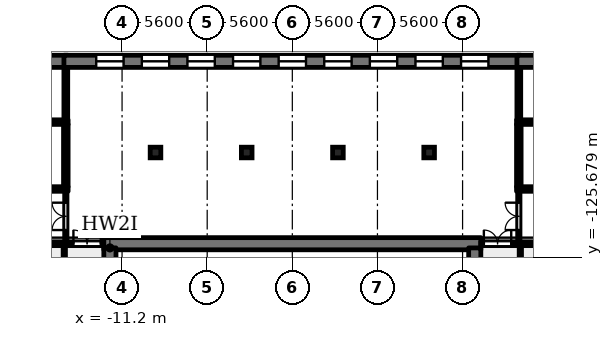
"""IFC4 building model, lengths in metres.
Left out: names, types, materials, properties, quantities, classifications, styles, units other than length and angle.
Written with IfcOpenShell. Run it as: python <this file> out.ifc"""

import sys

from ifc_helpers import new_model, si_unit, direction, frame, frame_2d, origin, origin_2d, place, context, subcontext, project, spatial, rectangle, extrude, element, fill, save


model = new_model("IFC4")
c1 = context("Model", 3, precision=1e-05, world=origin(), true_north=direction((0.0, 1.0)))
c2 = subcontext(c1, "Body", "Model", "MODEL_VIEW")
j1 = project(units=[si_unit("LENGTHUNIT", "METRE"), si_unit("PLANEANGLEUNIT", "RADIAN")], contexts=[c1])
p1 = place(None, origin())
s1 = spatial("IfcSite", under=j1, at=p1, CompositionType="ELEMENT")
p2 = place(p1, origin())
s2 = spatial("IfcBuilding", under=s1, at=p2, CompositionType="ELEMENT")
p3 = place(p2, frame((0.0, 0.0, 20.9)))
s3 = spatial("IfcBuildingStorey", under=s2, at=p3, CompositionType="ELEMENT", Elevation=20.9)
for number, where, z_axis, x_axis in (
    (1, (-9.0, -118.8, 0.0), (0.0, 0.0, 1.0), (1.0, 0.0, 0.0)),
    (2, (-3.0, -118.8, 0.0), (0.0, 0.0, 1.0), (1.0, 0.0, 0.0)),
    (3, (3.0, -118.8, 0.0), (0.0, 0.0, 1.0), (1.0, 0.0, 0.0)),
    (4, (9.0, -118.8, 0.0), (0.0, 0.0, 1.0), (1.0, 0.0, 0.0)),
):
    element("IfcColumn", number, at=place(p3, frame(where, z_axis=z_axis, x_axis=x_axis)), inside=s3, PredefinedType="COLUMN", context=c2, shape_type="SweptSolid", body=[
        extrude(rectangle(XDim=0.7, YDim=0.7, at=origin_2d()), origin(), (0.0, 0.0, 1.0), 6.591),
    ])
p4 = place(p3, frame((-29.2, -124.8, 0.0), z_axis=(0.0, 0.0, 1.0), x_axis=(1.0, 0.0, 0.0)))
e5 = element("IfcWall", 5, at=p4, inside=s3, PredefinedType="SOLIDWALL", context=c2, shape_type="SweptSolid", body=[
    extrude(rectangle(XDim=16.8, YDim=0.25, at=frame_2d((8.4, 0.0))), origin(), (0.0, 0.0, 1.0), 4.5),
])
p5 = place(p4, frame((14.8, 0.0, 0.0)))
e6 = element("IfcOpeningElement", 6, at=p5, cuts=e5, PredefinedType="OPENING", context=c2, shape_type="SweptSolid", body=[
    extrude(rectangle(XDim=1.8, YDim=2.1, at=frame_2d((0.9, 1.05))), frame((0.0, 0.135, 0.0), z_axis=(0.0, -1.0, 0.0), x_axis=(1.0, 0.0, 0.0)), (0.0, 0.0, 1.0), 0.27),
])
p6 = place(p3, frame((-12.4, -124.8, 0.0), z_axis=(0.0, 0.0, 1.0), x_axis=(1.0, 0.0, 0.0)))
e7 = element("IfcWall", 7, at=p6, inside=s3, PredefinedType="SOLIDWALL", context=c2, shape_type="SweptSolid", body=[
    extrude(rectangle(XDim=24.8, YDim=0.8, at=frame_2d((12.4, 0.0))), origin(), (0.0, 0.0, 1.0), 5.55),
])
p7 = place(p3, frame((12.4, -124.8, 0.0), z_axis=(0.0, 0.0, 1.0), x_axis=(1.0, 0.0, 0.0)))
e8 = element("IfcWall", 8, at=p7, inside=s3, PredefinedType="SOLIDWALL", context=c2, shape_type="SweptSolid", body=[
    extrude(rectangle(XDim=16.8, YDim=0.25, at=frame_2d((8.4, 0.0))), origin(), (0.0, 0.0, 1.0), 4.5),
])
p8 = place(p7, frame((0.2, 0.0, 0.0)))
e9 = element("IfcOpeningElement", 9, at=p8, cuts=e8, PredefinedType="OPENING", context=c2, shape_type="SweptSolid", body=[
    extrude(rectangle(XDim=1.8, YDim=2.1, at=frame_2d((0.9, 1.05))), frame((0.0, 0.135, 0.0), z_axis=(0.0, -1.0, 0.0), x_axis=(1.0, 0.0, 0.0)), (0.0, 0.0, 1.0), 0.27),
])
p9 = place(p3, frame((-29.2, -121.2, 0.0), z_axis=(0.0, 0.0, 1.0), x_axis=(1.0, 0.0, 0.0)))
e10 = element("IfcWall", 10, at=p9, inside=s3, PredefinedType="SOLIDWALL", context=c2, shape_type="SweptSolid", body=[
    extrude(rectangle(XDim=14.45, YDim=0.3, at=frame_2d((7.225, 0.0))), origin(), (0.0, 0.0, 1.0), 4.5),
])
p10 = place(p9, frame((4.0, 0.0, 0.0)))
e11 = element("IfcOpeningElement", 11, at=p10, cuts=e10, PredefinedType="OPENING", context=c2, shape_type="SweptSolid", body=[
    extrude(rectangle(XDim=1.1, YDim=2.1, at=frame_2d((0.55, 1.05))), frame((0.0, 0.16, 0.0), z_axis=(0.0, -1.0, 0.0), x_axis=(1.0, 0.0, 0.0)), (0.0, 0.0, 1.0), 0.32),
])
p11 = place(p9, frame((6.5, 0.0, 0.0)))
e12 = element("IfcOpeningElement", 12, at=p11, cuts=e10, PredefinedType="OPENING", context=c2, shape_type="SweptSolid", body=[
    extrude(rectangle(XDim=1.1, YDim=2.1, at=frame_2d((0.55, 1.05))), frame((0.0, 0.16, 0.0), z_axis=(0.0, -1.0, 0.0), x_axis=(1.0, 0.0, 0.0)), (0.0, 0.0, 1.0), 0.32),
])
p12 = place(p9, frame((0.95, 0.0, 0.0)))
e13 = element("IfcOpeningElement", 13, at=p12, cuts=e10, PredefinedType="OPENING", context=c2, shape_type="SweptSolid", body=[
    extrude(rectangle(XDim=1.1, YDim=2.1, at=frame_2d((0.55, 1.05))), frame((0.0, 0.16, 0.0), z_axis=(0.0, -1.0, 0.0), x_axis=(1.0, 0.0, 0.0)), (0.0, 0.0, 1.0), 0.32),
])
p13 = place(p9, frame((10.8, 0.0, 0.0)))
e14 = element("IfcOpeningElement", 14, at=p13, cuts=e10, PredefinedType="OPENING", context=c2, shape_type="SweptSolid", body=[
    extrude(rectangle(XDim=1.0, YDim=2.1, at=frame_2d((0.5, 1.05))), frame((0.0, 0.16, 0.0), z_axis=(0.0, -1.0, 0.0), x_axis=(1.0, 0.0, 0.0)), (0.0, 0.0, 1.0), 0.32),
])
p14 = place(p3, frame((14.75, -121.2, 0.0), z_axis=(0.0, 0.0, 1.0), x_axis=(1.0, 0.0, 0.0)))
e15 = element("IfcWall", 15, at=p14, inside=s3, PredefinedType="SOLIDWALL", context=c2, shape_type="SweptSolid", body=[
    extrude(rectangle(XDim=14.45, YDim=0.3, at=frame_2d((7.225, 0.0))), origin(), (0.0, 0.0, 1.0), 4.5),
])
p15 = place(p14, frame((6.85, 0.0, 0.0)))
e16 = element("IfcOpeningElement", 16, at=p15, cuts=e15, PredefinedType="OPENING", context=c2, shape_type="SweptSolid", body=[
    extrude(rectangle(XDim=1.1, YDim=2.1, at=frame_2d((0.55, 1.05))), frame((0.0, 0.16, 0.0), z_axis=(0.0, -1.0, 0.0), x_axis=(1.0, 0.0, 0.0)), (0.0, 0.0, 1.0), 0.32),
])
p16 = place(p14, frame((9.35, 0.0, 0.0)))
e17 = element("IfcOpeningElement", 17, at=p16, cuts=e15, PredefinedType="OPENING", context=c2, shape_type="SweptSolid", body=[
    extrude(rectangle(XDim=1.1, YDim=2.1, at=frame_2d((0.55, 1.05))), frame((0.0, 0.16, 0.0), z_axis=(0.0, -1.0, 0.0), x_axis=(1.0, 0.0, 0.0)), (0.0, 0.0, 1.0), 0.32),
])
p17 = place(p14, frame((12.4, 0.0, 0.0)))
e18 = element("IfcOpeningElement", 18, at=p17, cuts=e15, PredefinedType="OPENING", context=c2, shape_type="SweptSolid", body=[
    extrude(rectangle(XDim=1.1, YDim=2.1, at=frame_2d((0.55, 1.05))), frame((0.0, 0.16, 0.0), z_axis=(0.0, -1.0, 0.0), x_axis=(1.0, 0.0, 0.0)), (0.0, 0.0, 1.0), 0.32),
])
p18 = place(p14, frame((2.65, 0.0, 0.0)))
e19 = element("IfcOpeningElement", 19, at=p18, cuts=e15, PredefinedType="OPENING", context=c2, shape_type="SweptSolid", body=[
    extrude(rectangle(XDim=1.0, YDim=2.1, at=frame_2d((0.5, 1.05))), frame((0.0, 0.16, 0.0), z_axis=(0.0, -1.0, 0.0), x_axis=(1.0, 0.0, 0.0)), (0.0, 0.0, 1.0), 0.32),
])
for number, where, z_axis, x_axis in (
    (20, (-25.75, -116.8, 0.0), (0.0, 0.0, 1.0), (1.0, 0.0, 0.0)),
    (21, (14.75, -116.8, 0.0), (0.0, 0.0, 1.0), (1.0, 0.0, 0.0)),
):
    element("IfcWall", number, at=place(p3, frame(where, z_axis=z_axis, x_axis=x_axis)), inside=s3, PredefinedType="SOLIDWALL", context=c2, shape_type="SweptSolid", body=[
        extrude(rectangle(XDim=11.0, YDim=0.3, at=frame_2d((5.5, 0.0))), origin(), (0.0, 0.0, 1.0), 4.5),
    ])
p19 = place(p3, frame((-26.05, -112.8, 0.0), z_axis=(0.0, 0.0, 1.0), x_axis=(1.0, 0.0, 0.0)))
e22 = element("IfcWall", 22, at=p19, inside=s3, PredefinedType="SOLIDWALL", context=c2, shape_type="SweptSolid", body=[
    extrude(rectangle(XDim=11.275, YDim=0.8, at=frame_2d((5.637, 0.0))), origin(), (0.0, 0.0, 1.0), 4.5),
])
p20 = place(p3, frame((-15.025, -112.8, 0.0), z_axis=(0.0, 0.0, 1.0), x_axis=(1.0, 0.0, 0.0)))
e23 = element("IfcWall", 23, at=p20, inside=s3, PredefinedType="SOLIDWALL", context=c2, shape_type="SweptSolid", body=[
    extrude(rectangle(XDim=30.05, YDim=0.8, at=frame_2d((15.025, 0.0))), origin(), (0.0, 0.0, 1.0), 4.5),
])
p21 = place(p20, frame((2.125, 0.0, 0.9)))
e24 = element("IfcOpeningElement", 24, at=p21, cuts=e23, PredefinedType="OPENING", context=c2, shape_type="SweptSolid", body=[
    extrude(rectangle(XDim=1.8, YDim=1.5, at=frame_2d((0.9, 0.75))), frame((0.0, 0.41, 0.0), z_axis=(0.0, -1.0, 0.0), x_axis=(1.0, 0.0, 0.0)), (0.0, 0.0, 1.0), 0.82),
])
p22 = place(p20, frame((5.125, 0.0, 0.9)))
e25 = element("IfcOpeningElement", 25, at=p22, cuts=e23, PredefinedType="OPENING", context=c2, shape_type="SweptSolid", body=[
    extrude(rectangle(XDim=1.8, YDim=1.5, at=frame_2d((0.9, 0.75))), frame((0.0, 0.41, 0.0), z_axis=(0.0, -1.0, 0.0), x_axis=(1.0, 0.0, 0.0)), (0.0, 0.0, 1.0), 0.82),
])
p23 = place(p20, frame((8.125, 0.0, 0.9)))
e26 = element("IfcOpeningElement", 26, at=p23, cuts=e23, PredefinedType="OPENING", context=c2, shape_type="SweptSolid", body=[
    extrude(rectangle(XDim=1.8, YDim=1.5, at=frame_2d((0.9, 0.75))), frame((0.0, 0.41, 0.0), z_axis=(0.0, -1.0, 0.0), x_axis=(1.0, 0.0, 0.0)), (0.0, 0.0, 1.0), 0.82),
])
p24 = place(p20, frame((11.125, 0.0, 0.9)))
e27 = element("IfcOpeningElement", 27, at=p24, cuts=e23, PredefinedType="OPENING", context=c2, shape_type="SweptSolid", body=[
    extrude(rectangle(XDim=1.8, YDim=1.5, at=frame_2d((0.9, 0.75))), frame((0.0, 0.41, 0.0), z_axis=(0.0, -1.0, 0.0), x_axis=(1.0, 0.0, 0.0)), (0.0, 0.0, 1.0), 0.82),
])
p25 = place(p20, frame((14.125, 0.0, 0.9)))
e28 = element("IfcOpeningElement", 28, at=p25, cuts=e23, PredefinedType="OPENING", context=c2, shape_type="SweptSolid", body=[
    extrude(rectangle(XDim=1.8, YDim=1.5, at=frame_2d((0.9, 0.75))), frame((0.0, 0.41, 0.0), z_axis=(0.0, -1.0, 0.0), x_axis=(1.0, 0.0, 0.0)), (0.0, 0.0, 1.0), 0.82),
])
p26 = place(p20, frame((17.125, 0.0, 0.9)))
e29 = element("IfcOpeningElement", 29, at=p26, cuts=e23, PredefinedType="OPENING", context=c2, shape_type="SweptSolid", body=[
    extrude(rectangle(XDim=1.8, YDim=1.5, at=frame_2d((0.9, 0.75))), frame((0.0, 0.41, 0.0), z_axis=(0.0, -1.0, 0.0), x_axis=(1.0, 0.0, 0.0)), (0.0, 0.0, 1.0), 0.82),
])
p27 = place(p20, frame((20.125, 0.0, 0.9)))
e30 = element("IfcOpeningElement", 30, at=p27, cuts=e23, PredefinedType="OPENING", context=c2, shape_type="SweptSolid", body=[
    extrude(rectangle(XDim=1.8, YDim=1.5, at=frame_2d((0.9, 0.75))), frame((0.0, 0.41, 0.0), z_axis=(0.0, -1.0, 0.0), x_axis=(1.0, 0.0, 0.0)), (0.0, 0.0, 1.0), 0.82),
])
p28 = place(p20, frame((23.125, 0.0, 0.9)))
e31 = element("IfcOpeningElement", 31, at=p28, cuts=e23, PredefinedType="OPENING", context=c2, shape_type="SweptSolid", body=[
    extrude(rectangle(XDim=1.8, YDim=1.5, at=frame_2d((0.9, 0.75))), frame((0.0, 0.41, 0.0), z_axis=(0.0, -1.0, 0.0), x_axis=(1.0, 0.0, 0.0)), (0.0, 0.0, 1.0), 0.82),
])
p29 = place(p20, frame((26.125, 0.0, 0.9)))
e32 = element("IfcOpeningElement", 32, at=p29, cuts=e23, PredefinedType="OPENING", context=c2, shape_type="SweptSolid", body=[
    extrude(rectangle(XDim=1.8, YDim=1.5, at=frame_2d((0.9, 0.75))), frame((0.0, 0.41, 0.0), z_axis=(0.0, -1.0, 0.0), x_axis=(1.0, 0.0, 0.0)), (0.0, 0.0, 1.0), 0.82),
])
p30 = place(p3, frame((14.775, -112.8, 0.0), z_axis=(0.0, 0.0, 1.0), x_axis=(1.0, 0.0, 0.0)))
e33 = element("IfcWall", 33, at=p30, inside=s3, PredefinedType="SOLIDWALL", context=c2, shape_type="SweptSolid", body=[
    extrude(rectangle(XDim=11.275, YDim=0.8, at=frame_2d((5.637, 0.0))), origin(), (0.0, 0.0, 1.0), 4.5),
])
p31 = place(p3, frame((-15.0, -131.075, 0.0), z_axis=(0.0, 0.0, 1.0), x_axis=(0.0, 1.0, 0.0)))
e34 = element("IfcWall", 34, at=p31, inside=s3, PredefinedType="PARTITIONING", context=c2, shape_type="SweptSolid", body=[
    extrude(rectangle(XDim=6.15, YDim=0.15, at=frame_2d((3.075, 0.0))), origin(), (0.0, 0.0, 1.0), 4.5),
])
p32 = place(p3, frame((-14.9, -124.675, 0.0), z_axis=(0.0, 0.0, 1.0), x_axis=(0.0, 1.0, 0.0)))
e35 = element("IfcWall", 35, at=p32, inside=s3, PredefinedType="PARTITIONING", context=c2, shape_type="SweptSolid", body=[
    extrude(rectangle(XDim=3.325, YDim=0.15, at=frame_2d((1.663, 0.0))), origin(), (0.0, 0.0, 1.0), 4.5),
])
p33 = place(p32, frame((0.775, 0.0, 0.0)))
e36 = element("IfcOpeningElement", 36, at=p33, cuts=e35, PredefinedType="OPENING", context=c2, shape_type="SweptSolid", body=[
    extrude(rectangle(XDim=1.8, YDim=2.1, at=frame_2d((0.9, 1.05))), frame((0.0, 0.085, 0.0), z_axis=(0.0, -1.0, 0.0), x_axis=(1.0, 0.0, 0.0)), (0.0, 0.0, 1.0), 0.17),
])
p34 = place(p3, frame((-14.9, -121.05, 0.0), z_axis=(0.0, 0.0, 1.0), x_axis=(0.0, 1.0, 0.0)))
e37 = element("IfcWall", 37, at=p34, inside=s3, PredefinedType="SOLIDWALL", context=c2, shape_type="SweptSolid", body=[
    extrude(rectangle(XDim=4.1, YDim=0.3, at=frame_2d((2.05, 0.0))), origin(), (0.0, 0.0, 1.0), 4.5),
])
p35 = place(p3, frame((-14.9, -116.65, 0.0), z_axis=(0.0, 0.0, 1.0), x_axis=(0.0, 1.0, 0.0)))
e38 = element("IfcWall", 38, at=p35, inside=s3, PredefinedType="SOLIDWALL", context=c2, shape_type="SweptSolid", body=[
    extrude(rectangle(XDim=3.45, YDim=0.25, at=frame_2d((1.725, 0.0))), origin(), (0.0, 0.0, 1.0), 4.5),
])
for number, where, z_axis, x_axis in (
    (39, (-12.0, -159.2, 0.0), (0.0, 0.0, 1.0), (0.0, 1.0, 0.0)),
    (40, (12.0, -159.2, 0.0), (0.0, 0.0, 1.0), (0.0, 1.0, 0.0)),
):
    element("IfcWall", number, at=place(p3, frame(where, z_axis=z_axis, x_axis=x_axis)), inside=s3, PredefinedType="SOLIDWALL", context=c2, shape_type="SweptSolid", body=[
        extrude(rectangle(XDim=34.125, YDim=0.8, at=frame_2d((17.062, 0.0))), origin(), (0.0, 0.0, 1.0), 5.55),
    ])
p36 = place(p3, frame((14.9, -124.675, 0.0), z_axis=(0.0, 0.0, 1.0), x_axis=(0.0, 1.0, 0.0)))
e41 = element("IfcWall", 41, at=p36, inside=s3, PredefinedType="PARTITIONING", context=c2, shape_type="SweptSolid", body=[
    extrude(rectangle(XDim=3.325, YDim=0.15, at=frame_2d((1.663, 0.0))), origin(), (0.0, 0.0, 1.0), 4.5),
])
p37 = place(p36, frame((0.775, 0.0, 0.0)))
e42 = element("IfcOpeningElement", 42, at=p37, cuts=e41, PredefinedType="OPENING", context=c2, shape_type="SweptSolid", body=[
    extrude(rectangle(XDim=1.8, YDim=2.1, at=frame_2d((0.9, 1.05))), frame((0.0, 0.085, 0.0), z_axis=(0.0, -1.0, 0.0), x_axis=(1.0, 0.0, 0.0)), (0.0, 0.0, 1.0), 0.17),
])
p38 = place(p3, frame((14.9, -121.05, 0.0), z_axis=(0.0, 0.0, 1.0), x_axis=(0.0, 1.0, 0.0)))
e43 = element("IfcWall", 43, at=p38, inside=s3, PredefinedType="SOLIDWALL", context=c2, shape_type="SweptSolid", body=[
    extrude(rectangle(XDim=4.1, YDim=0.3, at=frame_2d((2.05, 0.0))), origin(), (0.0, 0.0, 1.0), 4.5),
])
p39 = place(p3, frame((14.9, -116.65, 0.0), z_axis=(0.0, 0.0, 1.0), x_axis=(0.0, 1.0, 0.0)))
e44 = element("IfcWall", 44, at=p39, inside=s3, PredefinedType="SOLIDWALL", context=c2, shape_type="SweptSolid", body=[
    extrude(rectangle(XDim=3.45, YDim=0.25, at=frame_2d((1.725, 0.0))), origin(), (0.0, 0.0, 1.0), 4.5),
])
p40 = place(p3, frame((15.0, -131.075, 0.0), z_axis=(0.0, 0.0, 1.0), x_axis=(0.0, 1.0, 0.0)))
e45 = element("IfcWall", 45, at=p40, inside=s3, PredefinedType="PARTITIONING", context=c2, shape_type="SweptSolid", body=[
    extrude(rectangle(XDim=6.15, YDim=0.15, at=frame_2d((3.075, 0.0))), origin(), (0.0, 0.0, 1.0), 4.5),
])
p41 = place(p21, origin())
e46 = element("IfcWindow", 46, at=p41, inside=s3, PartitioningType="SINGLE_PANEL", PredefinedType="WINDOW", context=c2, shape_type="SweptSolid", body=[
    extrude(rectangle(XDim=1.8, YDim=1.5, at=frame_2d((0.9, 0.75))), frame((0.0, 0.03, 0.0), z_axis=(0.0, -1.0, 0.0), x_axis=(1.0, 0.0, 0.0)), (0.0, 0.0, 1.0), 0.06),
])
fill(e24, e46)
p42 = place(p22, origin())
e47 = element("IfcWindow", 47, at=p42, inside=s3, PartitioningType="SINGLE_PANEL", PredefinedType="WINDOW", context=c2, shape_type="SweptSolid", body=[
    extrude(rectangle(XDim=1.8, YDim=1.5, at=frame_2d((0.9, 0.75))), frame((0.0, 0.03, 0.0), z_axis=(0.0, -1.0, 0.0), x_axis=(1.0, 0.0, 0.0)), (0.0, 0.0, 1.0), 0.06),
])
fill(e25, e47)
p43 = place(p23, origin())
e48 = element("IfcWindow", 48, at=p43, inside=s3, PartitioningType="SINGLE_PANEL", PredefinedType="WINDOW", context=c2, shape_type="SweptSolid", body=[
    extrude(rectangle(XDim=1.8, YDim=1.5, at=frame_2d((0.9, 0.75))), frame((0.0, 0.03, 0.0), z_axis=(0.0, -1.0, 0.0), x_axis=(1.0, 0.0, 0.0)), (0.0, 0.0, 1.0), 0.06),
])
fill(e26, e48)
p44 = place(p24, origin())
e49 = element("IfcWindow", 49, at=p44, inside=s3, PartitioningType="SINGLE_PANEL", PredefinedType="WINDOW", context=c2, shape_type="SweptSolid", body=[
    extrude(rectangle(XDim=1.8, YDim=1.5, at=frame_2d((0.9, 0.75))), frame((0.0, 0.03, 0.0), z_axis=(0.0, -1.0, 0.0), x_axis=(1.0, 0.0, 0.0)), (0.0, 0.0, 1.0), 0.06),
])
fill(e27, e49)
p45 = place(p25, origin())
e50 = element("IfcWindow", 50, at=p45, inside=s3, PartitioningType="SINGLE_PANEL", PredefinedType="WINDOW", context=c2, shape_type="SweptSolid", body=[
    extrude(rectangle(XDim=1.8, YDim=1.5, at=frame_2d((0.9, 0.75))), frame((0.0, 0.03, 0.0), z_axis=(0.0, -1.0, 0.0), x_axis=(1.0, 0.0, 0.0)), (0.0, 0.0, 1.0), 0.06),
])
fill(e28, e50)
p46 = place(p26, origin())
e51 = element("IfcWindow", 51, at=p46, inside=s3, PartitioningType="SINGLE_PANEL", PredefinedType="WINDOW", context=c2, shape_type="SweptSolid", body=[
    extrude(rectangle(XDim=1.8, YDim=1.5, at=frame_2d((0.9, 0.75))), frame((0.0, 0.03, 0.0), z_axis=(0.0, -1.0, 0.0), x_axis=(1.0, 0.0, 0.0)), (0.0, 0.0, 1.0), 0.06),
])
fill(e29, e51)
p47 = place(p27, origin())
e52 = element("IfcWindow", 52, at=p47, inside=s3, PartitioningType="SINGLE_PANEL", PredefinedType="WINDOW", context=c2, shape_type="SweptSolid", body=[
    extrude(rectangle(XDim=1.8, YDim=1.5, at=frame_2d((0.9, 0.75))), frame((0.0, 0.03, 0.0), z_axis=(0.0, -1.0, 0.0), x_axis=(1.0, 0.0, 0.0)), (0.0, 0.0, 1.0), 0.06),
])
fill(e30, e52)
p48 = place(p28, origin())
e53 = element("IfcWindow", 53, at=p48, inside=s3, PartitioningType="SINGLE_PANEL", PredefinedType="WINDOW", context=c2, shape_type="SweptSolid", body=[
    extrude(rectangle(XDim=1.8, YDim=1.5, at=frame_2d((0.9, 0.75))), frame((0.0, 0.03, 0.0), z_axis=(0.0, -1.0, 0.0), x_axis=(1.0, 0.0, 0.0)), (0.0, 0.0, 1.0), 0.06),
])
fill(e31, e53)
p49 = place(p29, origin())
e54 = element("IfcWindow", 54, at=p49, inside=s3, PartitioningType="SINGLE_PANEL", PredefinedType="WINDOW", context=c2, shape_type="SweptSolid", body=[
    extrude(rectangle(XDim=1.8, YDim=1.5, at=frame_2d((0.9, 0.75))), frame((0.0, 0.03, 0.0), z_axis=(0.0, -1.0, 0.0), x_axis=(1.0, 0.0, 0.0)), (0.0, 0.0, 1.0), 0.06),
])
fill(e32, e54)
p50 = place(p33, origin())
e55 = element("IfcDoor", 55, at=p50, inside=s3, OperationType="DOUBLE_DOOR_SINGLE_SWING", PredefinedType="DOOR", context=c2, shape_type="SweptSolid", body=[
    extrude(rectangle(XDim=1.8, YDim=2.1, at=frame_2d((0.9, 1.05))), frame((0.0, 0.025, 0.0), z_axis=(0.0, -1.0, 0.0), x_axis=(1.0, 0.0, 0.0)), (0.0, 0.0, 1.0), 0.05),
])
fill(e36, e55)
p51 = place(p37, origin())
e56 = element("IfcDoor", 56, at=p51, inside=s3, OperationType="DOUBLE_DOOR_SINGLE_SWING", PredefinedType="DOOR", context=c2, shape_type="SweptSolid", body=[
    extrude(rectangle(XDim=1.8, YDim=2.1, at=frame_2d((0.9, 1.05))), frame((0.0, 0.025, 0.0), z_axis=(0.0, -1.0, 0.0), x_axis=(1.0, 0.0, 0.0)), (0.0, 0.0, 1.0), 0.05),
])
fill(e42, e56)
p52 = place(p5, origin())
e57 = element("IfcDoor", 57, at=p52, inside=s3, OperationType="DOUBLE_DOOR_SINGLE_SWING", PredefinedType="DOOR", context=c2, shape_type="SweptSolid", body=[
    extrude(rectangle(XDim=1.8, YDim=2.1, at=frame_2d((0.9, 1.05))), frame((0.0, 0.025, 0.0), z_axis=(0.0, -1.0, 0.0), x_axis=(1.0, 0.0, 0.0)), (0.0, 0.0, 1.0), 0.05),
])
fill(e6, e57)
p53 = place(p8, origin())
e58 = element("IfcDoor", 58, at=p53, inside=s3, OperationType="DOUBLE_DOOR_SINGLE_SWING", PredefinedType="DOOR", context=c2, shape_type="SweptSolid", body=[
    extrude(rectangle(XDim=1.8, YDim=2.1, at=frame_2d((0.9, 1.05))), frame((0.0, 0.025, 0.0), z_axis=(0.0, -1.0, 0.0), x_axis=(1.0, 0.0, 0.0)), (0.0, 0.0, 1.0), 0.05),
])
fill(e9, e58)
save(model, sys.argv[1])
